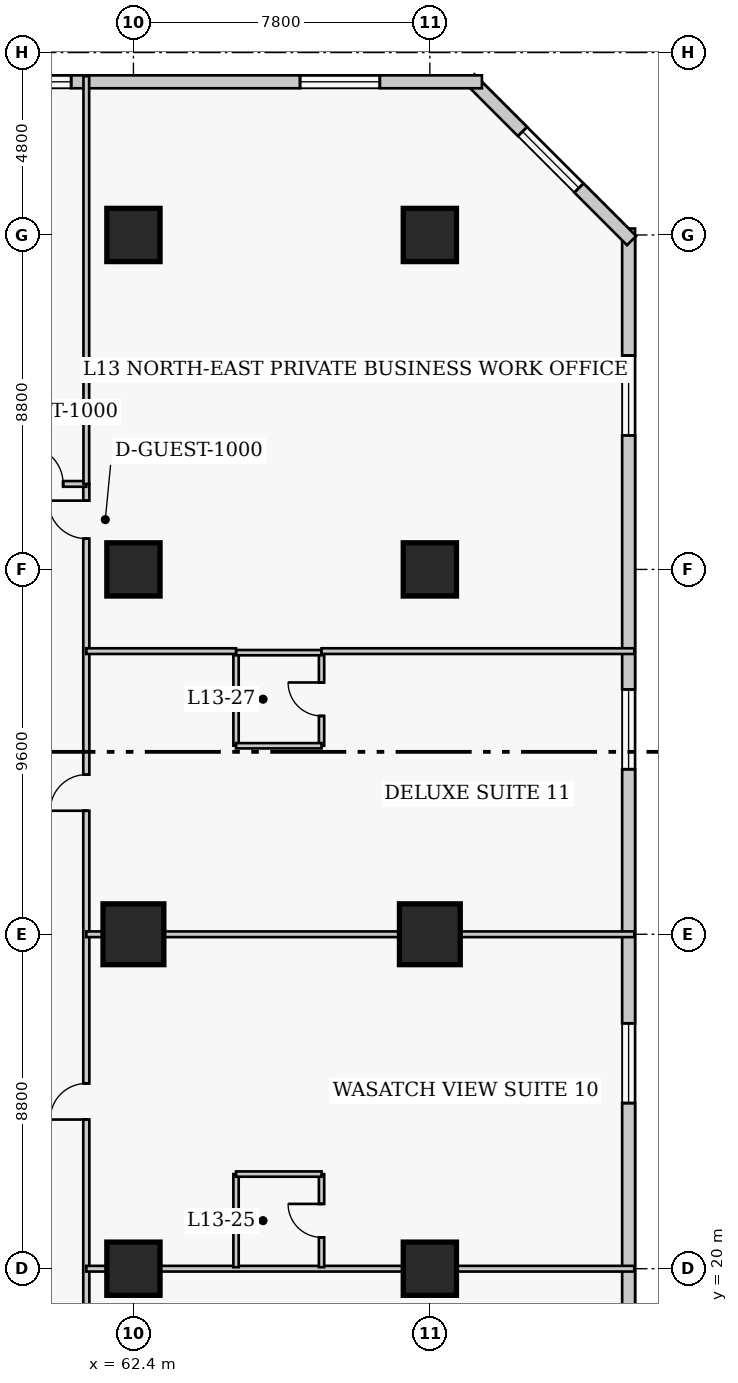
"""IFC4 building model, lengths in metres.
Left out: names, types, materials, properties, quantities, classifications, styles, units other than length and angle.
Written with IfcOpenShell. Run it as: python <this file> out.ifc"""

import sys

from ifc_helpers import new_model, si_unit, direction, frame, frame_2d, origin, origin_2d, place, context, subcontext, project, spatial, rectangle, extrude, element, fill, save


model = new_model("IFC4")
c1 = context("Model", 3, precision=1e-05, world=origin(), true_north=direction((0.0, 1.0)))
c2 = subcontext(c1, "Body", "Model", "MODEL_VIEW")
j1 = project(units=[si_unit("LENGTHUNIT", "METRE"), si_unit("PLANEANGLEUNIT", "RADIAN")], contexts=[c1])
p1 = place(None, origin())
s1 = spatial("IfcSite", under=j1, at=p1, CompositionType="ELEMENT")
p2 = place(p1, origin())
s2 = spatial("IfcBuilding", under=s1, at=p2, CompositionType="ELEMENT")
p3 = place(p2, frame((0.0, 0.0, 56.4)))
s3 = spatial("IfcBuildingStorey", under=s2, at=p3, CompositionType="ELEMENT", Elevation=56.4)
p4 = place(p3, frame((62.4, 20.0, 0.0), z_axis=(0.0, 0.0, 1.0), x_axis=(1.0, 0.0, 0.0)))
e1 = element("IfcColumn", 1, at=p4, inside=s3, PredefinedType="COLUMN", context=c2, shape_type="SweptSolid", body=[
    extrude(rectangle(XDim=1.4, YDim=1.4, at=origin_2d()), origin(), (0.0, 0.0, 1.0), 3.8),
])
p5 = place(p3, frame((62.4, 28.8, 0.0), z_axis=(0.0, 0.0, 1.0), x_axis=(1.0, 0.0, 0.0)))
e2 = element("IfcColumn", 2, at=p5, inside=s3, PredefinedType="COLUMN", context=c2, shape_type="SweptSolid", body=[
    extrude(rectangle(XDim=1.6, YDim=1.6, at=origin_2d()), origin(), (0.0, 0.0, 1.0), 3.8),
])
for number, where, z_axis, x_axis in (
    (3, (62.4, 38.4, 0.0), (0.0, 0.0, 1.0), (1.0, 0.0, 0.0)),
    (4, (62.4, 47.2, 0.0), (0.0, 0.0, 1.0), (1.0, 0.0, 0.0)),
    (5, (70.2, 20.0, 0.0), (0.0, 0.0, 1.0), (1.0, 0.0, 0.0)),
):
    element("IfcColumn", number, at=place(p3, frame(where, z_axis=z_axis, x_axis=x_axis)), inside=s3, PredefinedType="COLUMN", context=c2, shape_type="SweptSolid", body=[
        extrude(rectangle(XDim=1.4, YDim=1.4, at=origin_2d()), origin(), (0.0, 0.0, 1.0), 3.8),
    ])
p6 = place(p3, frame((70.2, 28.8, 0.0), z_axis=(0.0, 0.0, 1.0), x_axis=(1.0, 0.0, 0.0)))
e6 = element("IfcColumn", 6, at=p6, inside=s3, PredefinedType="COLUMN", context=c2, shape_type="SweptSolid", body=[
    extrude(rectangle(XDim=1.6, YDim=1.6, at=origin_2d()), origin(), (0.0, 0.0, 1.0), 3.8),
])
for number, where, z_axis, x_axis in (
    (7, (70.2, 38.4, 0.0), (0.0, 0.0, 1.0), (1.0, 0.0, 0.0)),
    (8, (70.2, 47.2, 0.0), (0.0, 0.0, 1.0), (1.0, 0.0, 0.0)),
):
    element("IfcColumn", number, at=place(p3, frame(where, z_axis=z_axis, x_axis=x_axis)), inside=s3, PredefinedType="COLUMN", context=c2, shape_type="SweptSolid", body=[
        extrude(rectangle(XDim=1.4, YDim=1.4, at=origin_2d()), origin(), (0.0, 0.0, 1.0), 3.8),
    ])
p7 = place(p3, frame((75.43, 12.23, 0.0), z_axis=(0.0, 0.0, 1.0), x_axis=(0.0, 1.0, 0.0)))
e9 = element("IfcWall", 9, at=p7, inside=s3, PredefinedType="SOLIDWALL", context=c2, shape_type="SweptSolid", body=[
    extrude(rectangle(XDim=35.14, YDim=0.34, at=frame_2d((17.57, 0.0))), origin(), (0.0, 0.0, 1.0), 3.54),
])
p8 = place(p7, frame((3.343, 0.0, 0.85)))
e10 = element("IfcOpeningElement", 10, at=p8, cuts=e9, PredefinedType="OPENING", context=c2, shape_type="SweptSolid", body=[
    extrude(rectangle(XDim=2.1, YDim=1.85, at=frame_2d((1.05, 0.925))), frame((0.0, 0.18, 0.0), z_axis=(0.0, -1.0, 0.0), x_axis=(1.0, 0.0, 0.0)), (0.0, 0.0, 1.0), 0.36),
])
p9 = place(p7, frame((12.127, 0.0, 0.85)))
e11 = element("IfcOpeningElement", 11, at=p9, cuts=e9, PredefinedType="OPENING", context=c2, shape_type="SweptSolid", body=[
    extrude(rectangle(XDim=2.1, YDim=1.85, at=frame_2d((1.05, 0.925))), frame((0.0, 0.18, 0.0), z_axis=(0.0, -1.0, 0.0), x_axis=(1.0, 0.0, 0.0)), (0.0, 0.0, 1.0), 0.36),
])
p10 = place(p7, frame((20.913, 0.0, 0.85)))
e12 = element("IfcOpeningElement", 12, at=p10, cuts=e9, PredefinedType="OPENING", context=c2, shape_type="SweptSolid", body=[
    extrude(rectangle(XDim=2.1, YDim=1.85, at=frame_2d((1.05, 0.925))), frame((0.0, 0.18, 0.0), z_axis=(0.0, -1.0, 0.0), x_axis=(1.0, 0.0, 0.0)), (0.0, 0.0, 1.0), 0.36),
])
p11 = place(p7, frame((29.698, 0.0, 0.85)))
e13 = element("IfcOpeningElement", 13, at=p11, cuts=e9, PredefinedType="OPENING", context=c2, shape_type="SweptSolid", body=[
    extrude(rectangle(XDim=2.1, YDim=1.85, at=frame_2d((1.05, 0.925))), frame((0.0, 0.18, 0.0), z_axis=(0.0, -1.0, 0.0), x_axis=(1.0, 0.0, 0.0)), (0.0, 0.0, 1.0), 0.36),
])
p12 = place(p3, frame((75.508, 47.052, 0.0), z_axis=(0.0, 0.0, 1.0), x_axis=(-0.707106781187, 0.707106781187, 0.0)))
e14 = element("IfcWall", 14, at=p12, inside=s3, PredefinedType="SOLIDWALL", context=c2, shape_type="SweptSolid", body=[
    extrude(rectangle(XDim=6.02, YDim=0.34, at=frame_2d((3.01, 0.0))), origin(), (0.0, 0.0, 1.0), 3.54),
])
p13 = place(p12, frame((1.96, 0.0, 0.85)))
e15 = element("IfcOpeningElement", 15, at=p13, cuts=e14, PredefinedType="OPENING", context=c2, shape_type="SweptSolid", body=[
    extrude(rectangle(XDim=2.1, YDim=1.85, at=frame_2d((1.05, 0.925))), frame((0.0, 0.18, 0.0), z_axis=(0.0, -1.0, 0.0), x_axis=(1.0, 0.0, 0.0)), (0.0, 0.0, 1.0), 0.36),
])
p14 = place(p3, frame((71.57, 51.23, 0.0), z_axis=(0.0, 0.0, 1.0), x_axis=(-1.0, 0.0, 0.0)))
e16 = element("IfcWall", 16, at=p14, inside=s3, PredefinedType="SOLIDWALL", context=c2, shape_type="SweptSolid", body=[
    extrude(rectangle(XDim=29.89, YDim=0.34, at=frame_2d((14.945, 0.0))), origin(), (0.0, 0.0, 1.0), 3.54),
])
p15 = place(p14, frame((2.686, 0.0, 0.85)))
e17 = element("IfcOpeningElement", 17, at=p15, cuts=e16, PredefinedType="OPENING", context=c2, shape_type="SweptSolid", body=[
    extrude(rectangle(XDim=2.1, YDim=1.85, at=frame_2d((1.05, 0.925))), frame((0.0, 0.18, 0.0), z_axis=(0.0, -1.0, 0.0), x_axis=(1.0, 0.0, 0.0)), (0.0, 0.0, 1.0), 0.36),
])
p16 = place(p14, frame((10.809, 0.0, 0.85)))
e18 = element("IfcOpeningElement", 18, at=p16, cuts=e16, PredefinedType="OPENING", context=c2, shape_type="SweptSolid", body=[
    extrude(rectangle(XDim=2.1, YDim=1.85, at=frame_2d((1.05, 0.925))), frame((0.0, 0.18, 0.0), z_axis=(0.0, -1.0, 0.0), x_axis=(1.0, 0.0, 0.0)), (0.0, 0.0, 1.0), 0.36),
])
p17 = place(p14, frame((17.631, 0.0, 0.85)))
e19 = element("IfcOpeningElement", 19, at=p17, cuts=e16, PredefinedType="OPENING", context=c2, shape_type="SweptSolid", body=[
    extrude(rectangle(XDim=2.1, YDim=1.85, at=frame_2d((1.05, 0.925))), frame((0.0, 0.18, 0.0), z_axis=(0.0, -1.0, 0.0), x_axis=(1.0, 0.0, 0.0)), (0.0, 0.0, 1.0), 0.36),
])
p18 = place(p14, frame((25.104, 0.0, 0.85)))
e20 = element("IfcOpeningElement", 20, at=p18, cuts=e16, PredefinedType="OPENING", context=c2, shape_type="SweptSolid", body=[
    extrude(rectangle(XDim=2.1, YDim=1.85, at=frame_2d((1.05, 0.925))), frame((0.0, 0.18, 0.0), z_axis=(0.0, -1.0, 0.0), x_axis=(1.0, 0.0, 0.0)), (0.0, 0.0, 1.0), 0.36),
])
p19 = place(p3, frame((61.16, 10.25, 0.0), z_axis=(0.0, 0.0, 1.0), x_axis=(0.0, 1.0, 0.0)))
e21 = element("IfcWall", 21, at=p19, inside=s3, PredefinedType="PARTITIONING", context=c2, shape_type="SweptSolid", body=[
    extrude(rectangle(XDim=30.4, YDim=0.16, at=frame_2d((15.2, 0.0))), origin(), (0.0, 0.0, 1.0), 3.54),
])
p20 = place(p19, frame((4.4, 0.0, 0.0)))
e22 = element("IfcOpeningElement", 22, at=p20, cuts=e21, PredefinedType="OPENING", context=c2, shape_type="SweptSolid", body=[
    extrude(rectangle(XDim=0.95, YDim=2.1, at=frame_2d((0.475, 1.05))), frame((0.0, 0.09, 0.0), z_axis=(0.0, -1.0, 0.0), x_axis=(1.0, 0.0, 0.0)), (0.0, 0.0, 1.0), 0.18),
])
p21 = place(p19, frame((13.675, 0.0, 0.0)))
e23 = element("IfcOpeningElement", 23, at=p21, cuts=e21, PredefinedType="OPENING", context=c2, shape_type="SweptSolid", body=[
    extrude(rectangle(XDim=0.95, YDim=2.1, at=frame_2d((0.475, 1.05))), frame((0.0, 0.09, 0.0), z_axis=(0.0, -1.0, 0.0), x_axis=(1.0, 0.0, 0.0)), (0.0, 0.0, 1.0), 0.18),
])
p22 = place(p19, frame((21.8, 0.0, 0.0)))
e24 = element("IfcOpeningElement", 24, at=p22, cuts=e21, PredefinedType="OPENING", context=c2, shape_type="SweptSolid", body=[
    extrude(rectangle(XDim=0.95, YDim=2.1, at=frame_2d((0.475, 1.05))), frame((0.0, 0.09, 0.0), z_axis=(0.0, -1.0, 0.0), x_axis=(1.0, 0.0, 0.0)), (0.0, 0.0, 1.0), 0.18),
])
p23 = place(p19, frame((28.96, 0.0, 0.0)))
e25 = element("IfcOpeningElement", 25, at=p23, cuts=e21, PredefinedType="OPENING", context=c2, shape_type="SweptSolid", body=[
    extrude(rectangle(XDim=1.0, YDim=2.15, at=frame_2d((0.5, 1.075))), frame((0.0, 0.09, 0.0), z_axis=(0.0, -1.0, 0.0), x_axis=(1.0, 0.0, 0.0)), (0.0, 0.0, 1.0), 0.18),
])
p24 = place(p3, frame((56.8, 40.65, 0.0), z_axis=(0.0, 0.0, 1.0), x_axis=(1.0, 0.0, 0.0)))
e26 = element("IfcWall", 26, at=p24, inside=s3, PredefinedType="PARTITIONING", context=c2, shape_type="SweptSolid", body=[
    extrude(rectangle(XDim=4.36, YDim=0.15, at=frame_2d((2.18, 0.0))), origin(), (0.0, 0.0, 1.0), 3.54),
])
p25 = place(p24, frame((2.75, 0.0, 0.0)))
e27 = element("IfcOpeningElement", 27, at=p25, cuts=e26, PredefinedType="OPENING", context=c2, shape_type="SweptSolid", body=[
    extrude(rectangle(XDim=1.0, YDim=2.15, at=frame_2d((0.5, 1.075))), frame((0.0, 0.085, 0.0), z_axis=(0.0, -1.0, 0.0), x_axis=(1.0, 0.0, 0.0)), (0.0, 0.0, 1.0), 0.17),
])
p26 = place(p3, frame((61.16, 40.65, 0.0), z_axis=(0.0, 0.0, 1.0), x_axis=(0.0, 1.0, 0.0)))
e28 = element("IfcWall", 28, at=p26, inside=s3, PredefinedType="PARTITIONING", context=c2, shape_type="SweptSolid", body=[
    extrude(rectangle(XDim=10.73, YDim=0.15, at=frame_2d((5.365, 0.0))), origin(), (0.0, 0.0, 1.0), 3.54),
])
p27 = place(p3, frame((61.16, 20.0, 0.0), z_axis=(0.0, 0.0, 1.0), x_axis=(1.0, 0.0, 0.0)))
e29 = element("IfcWall", 29, at=p27, inside=s3, PredefinedType="PARTITIONING", context=c2, shape_type="SweptSolid", body=[
    extrude(rectangle(XDim=14.42, YDim=0.15, at=frame_2d((7.21, 0.0))), origin(), (0.0, 0.0, 1.0), 2.593),
])
p28 = place(p3, frame((65.1, 20.04, 0.0), z_axis=(0.0, 0.0, 1.0), x_axis=(0.0, 1.0, 0.0)))
e30 = element("IfcWall", 30, at=p28, inside=s3, PredefinedType="PLUMBINGWALL", context=c2, shape_type="SweptSolid", body=[
    extrude(rectangle(XDim=2.45, YDim=0.14, at=frame_2d((1.225, 0.0))), origin(), (0.0, 0.0, 1.0), 3.54),
])
p29 = place(p3, frame((67.35, 20.04, 0.0), z_axis=(0.0, 0.0, 1.0), x_axis=(0.0, 1.0, 0.0)))
e31 = element("IfcWall", 31, at=p29, inside=s3, PredefinedType="PLUMBINGWALL", context=c2, shape_type="SweptSolid", body=[
    extrude(rectangle(XDim=2.45, YDim=0.14, at=frame_2d((1.225, 0.0))), origin(), (0.0, 0.0, 1.0), 3.54),
])
p30 = place(p29, frame((0.785, 0.0, 0.0)))
e32 = element("IfcOpeningElement", 32, at=p30, cuts=e31, PredefinedType="OPENING", context=c2, shape_type="SweptSolid", body=[
    extrude(rectangle(XDim=0.88, YDim=2.05, at=frame_2d((0.44, 1.025))), frame((0.0, 0.08, 0.0), z_axis=(0.0, -1.0, 0.0), x_axis=(1.0, 0.0, 0.0)), (0.0, 0.0, 1.0), 0.16),
])
p31 = place(p3, frame((65.1, 22.49, 0.0), z_axis=(0.0, 0.0, 1.0), x_axis=(1.0, 0.0, 0.0)))
e33 = element("IfcWall", 33, at=p31, inside=s3, PredefinedType="PLUMBINGWALL", context=c2, shape_type="SweptSolid", body=[
    extrude(rectangle(XDim=2.25, YDim=0.14, at=frame_2d((1.125, 0.0))), origin(), (0.0, 0.0, 1.0), 3.54),
])
p32 = place(p3, frame((61.16, 28.8, 0.0), z_axis=(0.0, 0.0, 1.0), x_axis=(1.0, 0.0, 0.0)))
e34 = element("IfcWall", 34, at=p32, inside=s3, PredefinedType="PARTITIONING", context=c2, shape_type="SweptSolid", body=[
    extrude(rectangle(XDim=14.42, YDim=0.15, at=frame_2d((7.21, 0.0))), origin(), (0.0, 0.0, 1.0), 2.593),
])
p33 = place(p3, frame((65.1, 33.76, 0.0), z_axis=(0.0, 0.0, 1.0), x_axis=(0.0, 1.0, 0.0)))
e35 = element("IfcWall", 35, at=p33, inside=s3, PredefinedType="PLUMBINGWALL", context=c2, shape_type="SweptSolid", body=[
    extrude(rectangle(XDim=2.45, YDim=0.14, at=frame_2d((1.225, 0.0))), origin(), (0.0, 0.0, 1.0), 3.54),
])
p34 = place(p3, frame((67.35, 33.76, 0.0), z_axis=(0.0, 0.0, 1.0), x_axis=(0.0, 1.0, 0.0)))
e36 = element("IfcWall", 36, at=p34, inside=s3, PredefinedType="PLUMBINGWALL", context=c2, shape_type="SweptSolid", body=[
    extrude(rectangle(XDim=2.45, YDim=0.14, at=frame_2d((1.225, 0.0))), origin(), (0.0, 0.0, 1.0), 3.54),
])
p35 = place(p34, frame((0.785, 0.0, 0.0)))
e37 = element("IfcOpeningElement", 37, at=p35, cuts=e36, PredefinedType="OPENING", context=c2, shape_type="SweptSolid", body=[
    extrude(rectangle(XDim=0.88, YDim=2.05, at=frame_2d((0.44, 1.025))), frame((0.0, 0.08, 0.0), z_axis=(0.0, -1.0, 0.0), x_axis=(1.0, 0.0, 0.0)), (0.0, 0.0, 1.0), 0.16),
])
for number, where, z_axis, x_axis in (
    (38, (65.1, 33.76, 0.0), (0.0, 0.0, 1.0), (1.0, 0.0, 0.0)),
    (39, (65.1, 36.21, 0.0), (0.0, 0.0, 1.0), (1.0, 0.0, 0.0)),
):
    element("IfcWall", number, at=place(p3, frame(where, z_axis=z_axis, x_axis=x_axis)), inside=s3, PredefinedType="PLUMBINGWALL", context=c2, shape_type="SweptSolid", body=[
        extrude(rectangle(XDim=2.25, YDim=0.14, at=frame_2d((1.125, 0.0))), origin(), (0.0, 0.0, 1.0), 3.54),
    ])
p36 = place(p3, frame((61.16, 36.25, 0.0), z_axis=(0.0, 0.0, 1.0), x_axis=(1.0, 0.0, 0.0)))
e40 = element("IfcWall", 40, at=p36, inside=s3, PredefinedType="PARTITIONING", context=c2, shape_type="SweptSolid", body=[
    extrude(rectangle(XDim=3.94, YDim=0.15, at=frame_2d((1.97, 0.0))), origin(), (0.0, 0.0, 1.0), 3.54),
])
p37 = place(p3, frame((67.35, 36.25, 0.0), z_axis=(0.0, 0.0, 1.0), x_axis=(1.0, 0.0, 0.0)))
e41 = element("IfcWall", 41, at=p37, inside=s3, PredefinedType="PARTITIONING", context=c2, shape_type="SweptSolid", body=[
    extrude(rectangle(XDim=8.23, YDim=0.15, at=frame_2d((4.115, 0.0))), origin(), (0.0, 0.0, 1.0), 3.54),
])
p38 = place(p9, origin())
e42 = element("IfcWindow", 42, at=p38, inside=s3, PartitioningType="SINGLE_PANEL", PredefinedType="WINDOW", context=c2, shape_type="SweptSolid", body=[
    extrude(rectangle(XDim=2.1, YDim=1.85, at=frame_2d((1.05, 0.925))), frame((0.0, 0.03, 0.0), z_axis=(0.0, -1.0, 0.0), x_axis=(1.0, 0.0, 0.0)), (0.0, 0.0, 1.0), 0.06),
])
fill(e11, e42)
p39 = place(p10, origin())
e43 = element("IfcWindow", 43, at=p39, inside=s3, PartitioningType="SINGLE_PANEL", PredefinedType="WINDOW", context=c2, shape_type="SweptSolid", body=[
    extrude(rectangle(XDim=2.1, YDim=1.85, at=frame_2d((1.05, 0.925))), frame((0.0, 0.03, 0.0), z_axis=(0.0, -1.0, 0.0), x_axis=(1.0, 0.0, 0.0)), (0.0, 0.0, 1.0), 0.06),
])
fill(e12, e43)
p40 = place(p11, origin())
e44 = element("IfcWindow", 44, at=p40, inside=s3, PartitioningType="SINGLE_PANEL", PredefinedType="WINDOW", context=c2, shape_type="SweptSolid", body=[
    extrude(rectangle(XDim=2.1, YDim=1.85, at=frame_2d((1.05, 0.925))), frame((0.0, 0.03, 0.0), z_axis=(0.0, -1.0, 0.0), x_axis=(1.0, 0.0, 0.0)), (0.0, 0.0, 1.0), 0.06),
])
fill(e13, e44)
p41 = place(p13, origin())
e45 = element("IfcWindow", 45, at=p41, inside=s3, PartitioningType="SINGLE_PANEL", PredefinedType="WINDOW", context=c2, shape_type="SweptSolid", body=[
    extrude(rectangle(XDim=2.1, YDim=1.85, at=frame_2d((1.05, 0.925))), frame((0.0, 0.03, 0.0), z_axis=(0.0, -1.0, 0.0), x_axis=(1.0, 0.0, 0.0)), (0.0, 0.0, 1.0), 0.06),
])
fill(e15, e45)
p42 = place(p15, origin())
e46 = element("IfcWindow", 46, at=p42, inside=s3, PartitioningType="SINGLE_PANEL", PredefinedType="WINDOW", context=c2, shape_type="SweptSolid", body=[
    extrude(rectangle(XDim=2.1, YDim=1.85, at=frame_2d((1.05, 0.925))), frame((0.0, 0.03, 0.0), z_axis=(0.0, -1.0, 0.0), x_axis=(1.0, 0.0, 0.0)), (0.0, 0.0, 1.0), 0.06),
])
fill(e17, e46)
p43 = place(p16, origin())
e47 = element("IfcWindow", 47, at=p43, inside=s3, PartitioningType="SINGLE_PANEL", PredefinedType="WINDOW", context=c2, shape_type="SweptSolid", body=[
    extrude(rectangle(XDim=2.1, YDim=1.85, at=frame_2d((1.05, 0.925))), frame((0.0, 0.03, 0.0), z_axis=(0.0, -1.0, 0.0), x_axis=(1.0, 0.0, 0.0)), (0.0, 0.0, 1.0), 0.06),
])
fill(e18, e47)
p44 = place(p25, origin())
e48 = element("IfcDoor", 48, at=p44, inside=s3, OperationType="SINGLE_SWING_LEFT", PredefinedType="DOOR", context=c2, shape_type="SweptSolid", body=[
    extrude(rectangle(XDim=1.0, YDim=2.15, at=frame_2d((0.5, 1.075))), frame((0.0, 0.025, 0.0), z_axis=(0.0, -1.0, 0.0), x_axis=(1.0, 0.0, 0.0)), (0.0, 0.0, 1.0), 0.05),
])
fill(e27, e48)
p45 = place(p30, origin())
e49 = element("IfcDoor", 49, at=p45, inside=s3, OperationType="SINGLE_SWING_RIGHT", PredefinedType="DOOR", context=c2, shape_type="SweptSolid", body=[
    extrude(rectangle(XDim=0.88, YDim=2.05, at=frame_2d((0.44, 1.025))), frame((0.0, 0.025, 0.0), z_axis=(0.0, -1.0, 0.0), x_axis=(1.0, 0.0, 0.0)), (0.0, 0.0, 1.0), 0.05),
])
fill(e32, e49)
p46 = place(p21, origin())
e50 = element("IfcDoor", 50, at=p46, inside=s3, OperationType="SINGLE_SWING_LEFT", PredefinedType="DOOR", context=c2, shape_type="SweptSolid", body=[
    extrude(rectangle(XDim=0.95, YDim=2.1, at=frame_2d((0.475, 1.05))), frame((0.0, 0.025, 0.0), z_axis=(0.0, -1.0, 0.0), x_axis=(1.0, 0.0, 0.0)), (0.0, 0.0, 1.0), 0.05),
])
fill(e23, e50)
p47 = place(p35, origin())
e51 = element("IfcDoor", 51, at=p47, inside=s3, OperationType="SINGLE_SWING_RIGHT", PredefinedType="DOOR", context=c2, shape_type="SweptSolid", body=[
    extrude(rectangle(XDim=0.88, YDim=2.05, at=frame_2d((0.44, 1.025))), frame((0.0, 0.025, 0.0), z_axis=(0.0, -1.0, 0.0), x_axis=(1.0, 0.0, 0.0)), (0.0, 0.0, 1.0), 0.05),
])
fill(e37, e51)
p48 = place(p22, origin())
e52 = element("IfcDoor", 52, at=p48, inside=s3, OperationType="SINGLE_SWING_LEFT", PredefinedType="DOOR", context=c2, shape_type="SweptSolid", body=[
    extrude(rectangle(XDim=0.95, YDim=2.1, at=frame_2d((0.475, 1.05))), frame((0.0, 0.025, 0.0), z_axis=(0.0, -1.0, 0.0), x_axis=(1.0, 0.0, 0.0)), (0.0, 0.0, 1.0), 0.05),
])
fill(e24, e52)
p49 = place(p23, origin())
e53 = element("IfcDoor", 53, at=p49, inside=s3, OperationType="SINGLE_SWING_RIGHT", PredefinedType="DOOR", context=c2, shape_type="SweptSolid", body=[
    extrude(rectangle(XDim=1.0, YDim=2.15, at=frame_2d((0.5, 1.075))), frame((0.0, 0.025, 0.0), z_axis=(0.0, -1.0, 0.0), x_axis=(1.0, 0.0, 0.0)), (0.0, 0.0, 1.0), 0.05),
])
fill(e25, e53)
save(model, sys.argv[1])
